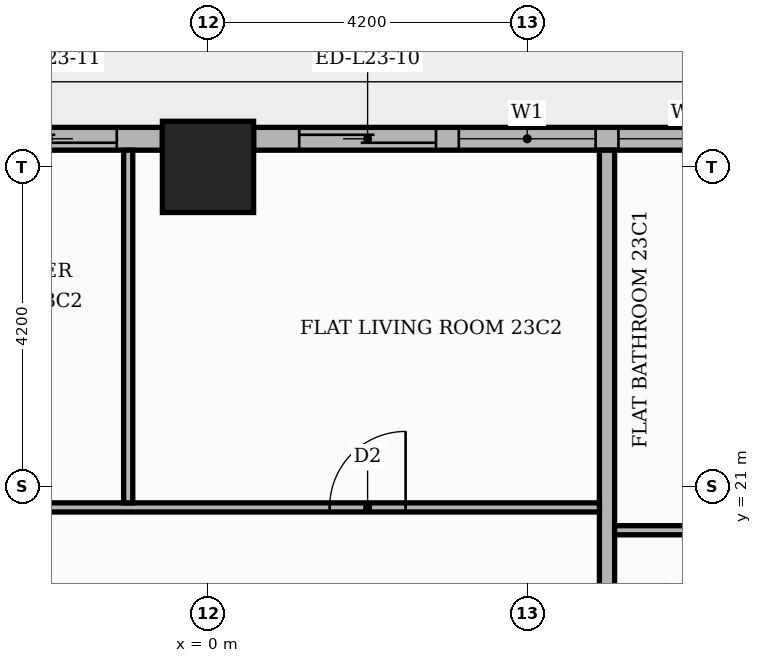
"""IFC4 building model, lengths in metres.
Left out: names, types, materials, properties, quantities, classifications, styles, units other than length and angle.
Written with IfcOpenShell. Run it as: python <this file> out.ifc"""

import sys

from ifc_helpers import new_model, si_unit, direction, frame, frame_2d, origin, origin_2d, place, context, subcontext, project, spatial, rectangle, extrude, element, fill, save


model = new_model("IFC4")
c1 = context("Model", 3, precision=1e-05, world=origin(), true_north=direction((0.0, 1.0)))
c2 = subcontext(c1, "Body", "Model", "MODEL_VIEW")
j1 = project(units=[si_unit("LENGTHUNIT", "METRE"), si_unit("PLANEANGLEUNIT", "RADIAN")], contexts=[c1])
p1 = place(None, origin())
s1 = spatial("IfcSite", under=j1, at=p1, CompositionType="ELEMENT")
p2 = place(p1, origin())
s2 = spatial("IfcBuilding", under=s1, at=p2, CompositionType="ELEMENT")
p3 = place(p2, frame((0.0, 0.0, 98.7)))
s3 = spatial("IfcBuildingStorey", under=s2, at=p3, CompositionType="ELEMENT", Elevation=98.7)
p4 = place(p3, frame((0.0, 25.2, 0.0), z_axis=(0.0, 0.0, 1.0), x_axis=(1.0, 0.0, 0.0)))
e1 = element("IfcColumn", 1, at=p4, inside=s3, PredefinedType="COLUMN", context=c2, shape_type="SweptSolid", body=[
    extrude(rectangle(XDim=1.2, YDim=1.2, at=origin_2d()), origin(), (0.0, 0.0, 1.0), 3.9),
])
p5 = place(p3, frame((7.8, 25.57, 0.0), z_axis=(0.0, 0.0, 1.0), x_axis=(-1.0, 0.0, 0.0)))
e2 = element("IfcWall", 2, at=p5, inside=s3, PredefinedType="STANDARD", context=c2, shape_type="SweptSolid", body=[
    extrude(rectangle(XDim=7.2, YDim=0.3, at=frame_2d((3.6, 0.0))), origin(), (0.0, 0.0, 1.0), 3.48),
])
p6 = place(p5, frame((0.6, 0.0, 0.9)))
e3 = element("IfcOpeningElement", 3, at=p6, cuts=e2, PredefinedType="OPENING", context=c2, shape_type="SweptSolid", body=[
    extrude(rectangle(XDim=1.8, YDim=2.1, at=frame_2d((0.9, 1.05))), frame((0.0, 0.16, 0.0), z_axis=(0.0, -1.0, 0.0), x_axis=(1.0, 0.0, 0.0)), (0.0, 0.0, 1.0), 0.32),
])
p7 = place(p5, frame((2.7, 0.0, 0.9)))
e4 = element("IfcOpeningElement", 4, at=p7, cuts=e2, PredefinedType="OPENING", context=c2, shape_type="SweptSolid", body=[
    extrude(rectangle(XDim=1.8, YDim=2.1, at=frame_2d((0.9, 1.05))), frame((0.0, 0.16, 0.0), z_axis=(0.0, -1.0, 0.0), x_axis=(1.0, 0.0, 0.0)), (0.0, 0.0, 1.0), 0.32),
])
p8 = place(p5, frame((4.8, 0.0, 0.0)))
e5 = element("IfcOpeningElement", 5, at=p8, cuts=e2, PredefinedType="OPENING", context=c2, shape_type="SweptSolid", body=[
    extrude(rectangle(XDim=1.8, YDim=2.4, at=frame_2d((0.9, 1.2))), frame((0.0, 0.16, 0.0), z_axis=(0.0, -1.0, 0.0), x_axis=(1.0, 0.0, 0.0)), (0.0, 0.0, 1.0), 0.32),
])
p9 = place(p3, frame((-0.6, 25.57, 0.0), z_axis=(0.0, 0.0, 1.0), x_axis=(-1.0, 0.0, 0.0)))
e6 = element("IfcWall", 6, at=p9, inside=s3, PredefinedType="STANDARD", context=c2, shape_type="SweptSolid", body=[
    extrude(rectangle(XDim=7.2, YDim=0.3, at=frame_2d((3.6, 0.0))), origin(), (0.0, 0.0, 1.0), 3.48),
])
p10 = place(p9, frame((0.6, 0.0, 0.0)))
e7 = element("IfcOpeningElement", 7, at=p10, cuts=e6, PredefinedType="OPENING", context=c2, shape_type="SweptSolid", body=[
    extrude(rectangle(XDim=1.8, YDim=2.4, at=frame_2d((0.9, 1.2))), frame((0.0, 0.16, 0.0), z_axis=(0.0, -1.0, 0.0), x_axis=(1.0, 0.0, 0.0)), (0.0, 0.0, 1.0), 0.32),
])
p11 = place(p9, frame((2.7, 0.0, 0.9)))
e8 = element("IfcOpeningElement", 8, at=p11, cuts=e6, PredefinedType="OPENING", context=c2, shape_type="SweptSolid", body=[
    extrude(rectangle(XDim=1.8, YDim=2.1, at=frame_2d((0.9, 1.05))), frame((0.0, 0.16, 0.0), z_axis=(0.0, -1.0, 0.0), x_axis=(1.0, 0.0, 0.0)), (0.0, 0.0, 1.0), 0.32),
])
p12 = place(p9, frame((4.8, 0.0, 0.9)))
e9 = element("IfcOpeningElement", 9, at=p12, cuts=e6, PredefinedType="OPENING", context=c2, shape_type="SweptSolid", body=[
    extrude(rectangle(XDim=1.8, YDim=2.1, at=frame_2d((0.9, 1.05))), frame((0.0, 0.16, 0.0), z_axis=(0.0, -1.0, 0.0), x_axis=(1.0, 0.0, 0.0)), (0.0, 0.0, 1.0), 0.32),
])
p13 = place(p3, frame((5.25, 13.75, 0.0), z_axis=(0.0, 0.0, 1.0), x_axis=(0.0, 1.0, 0.0)))
e10 = element("IfcWall", 10, at=p13, inside=s3, PredefinedType="PARTITIONING", context=c2, shape_type="SweptSolid", body=[
    extrude(rectangle(XDim=11.67, YDim=0.2, at=frame_2d((5.835, 0.0))), origin(), (0.0, 0.0, 1.0), 3.48),
])
p14 = place(p3, frame((5.35, 20.42, 0.0), z_axis=(0.0, 0.0, 1.0), x_axis=(1.0, 0.0, 0.0)))
e11 = element("IfcWall", 11, at=p14, inside=s3, PredefinedType="PARTITIONING", context=c2, shape_type="SweptSolid", body=[
    extrude(rectangle(XDim=20.07, YDim=0.12, at=frame_2d((10.035, 0.0))), origin(), (0.0, 0.0, 1.0), 3.48),
])
p15 = place(p14, frame((8.85, 0.0, 0.0)))
e12 = element("IfcOpeningElement", 12, at=p15, cuts=e11, PredefinedType="OPENING", context=c2, shape_type="SweptSolid", body=[
    extrude(rectangle(XDim=1.0, YDim=2.1, at=frame_2d((0.5, 1.05))), frame((0.0, 0.07, 0.0), z_axis=(0.0, -1.0, 0.0), x_axis=(1.0, 0.0, 0.0)), (0.0, 0.0, 1.0), 0.14),
])
p16 = place(p14, frame((5.75, 0.0, 0.0)))
e13 = element("IfcOpeningElement", 13, at=p16, cuts=e11, PredefinedType="OPENING", context=c2, shape_type="SweptSolid", body=[
    extrude(rectangle(XDim=0.9, YDim=2.1, at=frame_2d((0.45, 1.05))), frame((0.0, 0.07, 0.0), z_axis=(0.0, -1.0, 0.0), x_axis=(1.0, 0.0, 0.0)), (0.0, 0.0, 1.0), 0.14),
])
p17 = place(p3, frame((-13.55, 20.72, 0.0), z_axis=(0.0, 0.0, 1.0), x_axis=(1.0, 0.0, 0.0)))
e14 = element("IfcWall", 14, at=p17, inside=s3, PredefinedType="PARTITIONING", context=c2, shape_type="SweptSolid", body=[
    extrude(rectangle(XDim=18.7, YDim=0.12, at=frame_2d((9.35, 0.0))), origin(), (0.0, 0.0, 1.0), 3.48),
])
p18 = place(p17, frame((15.15, 0.0, 0.0)))
e15 = element("IfcOpeningElement", 15, at=p18, cuts=e14, PredefinedType="OPENING", context=c2, shape_type="SweptSolid", body=[
    extrude(rectangle(XDim=1.0, YDim=2.1, at=frame_2d((0.5, 1.05))), frame((0.0, 0.07, 0.0), z_axis=(0.0, -1.0, 0.0), x_axis=(1.0, 0.0, 0.0)), (0.0, 0.0, 1.0), 0.14),
])
p19 = place(p17, frame((9.95, 0.0, 0.0)))
e16 = element("IfcOpeningElement", 16, at=p19, cuts=e14, PredefinedType="OPENING", context=c2, shape_type="SweptSolid", body=[
    extrude(rectangle(XDim=0.9, YDim=2.1, at=frame_2d((0.45, 1.05))), frame((0.0, 0.07, 0.0), z_axis=(0.0, -1.0, 0.0), x_axis=(1.0, 0.0, 0.0)), (0.0, 0.0, 1.0), 0.14),
])
p20 = place(p17, frame((1.55, 0.0, 0.0)))
e17 = element("IfcOpeningElement", 17, at=p20, cuts=e14, PredefinedType="OPENING", context=c2, shape_type="SweptSolid", body=[
    extrude(rectangle(XDim=0.9, YDim=2.1, at=frame_2d((0.45, 1.05))), frame((0.0, 0.07, 0.0), z_axis=(0.0, -1.0, 0.0), x_axis=(1.0, 0.0, 0.0)), (0.0, 0.0, 1.0), 0.14),
])
p21 = place(p3, frame((-1.05, 20.78, 0.0), z_axis=(0.0, 0.0, 1.0), x_axis=(0.0, 1.0, 0.0)))
e18 = element("IfcWall", 18, at=p21, inside=s3, PredefinedType="PARTITIONING", context=c2, shape_type="SweptSolid", body=[
    extrude(rectangle(XDim=4.64, YDim=0.12, at=frame_2d((2.32, 0.0))), origin(), (0.0, 0.0, 1.0), 3.48),
])
p22 = place(p6, origin())
e19 = element("IfcWindow", 19, at=p22, inside=s3, PartitioningType="SINGLE_PANEL", PredefinedType="WINDOW", context=c2, shape_type="SweptSolid", body=[
    extrude(rectangle(XDim=1.8, YDim=2.1, at=frame_2d((0.9, 1.05))), frame((0.0, 0.03, 0.0), z_axis=(0.0, -1.0, 0.0), x_axis=(1.0, 0.0, 0.0)), (0.0, 0.0, 1.0), 0.06),
])
fill(e3, e19)
p23 = place(p7, origin())
e20 = element("IfcWindow", 20, at=p23, inside=s3, PartitioningType="SINGLE_PANEL", PredefinedType="WINDOW", context=c2, shape_type="SweptSolid", body=[
    extrude(rectangle(XDim=1.8, YDim=2.1, at=frame_2d((0.9, 1.05))), frame((0.0, 0.03, 0.0), z_axis=(0.0, -1.0, 0.0), x_axis=(1.0, 0.0, 0.0)), (0.0, 0.0, 1.0), 0.06),
])
fill(e4, e20)
p24 = place(p8, origin())
e21 = element("IfcDoor", 21, at=p24, inside=s3, OperationType="SLIDING_TO_RIGHT", PredefinedType="DOOR", context=c2, shape_type="SweptSolid", body=[
    extrude(rectangle(XDim=1.8, YDim=2.4, at=frame_2d((0.9, 1.2))), frame((0.0, 0.025, 0.0), z_axis=(0.0, -1.0, 0.0), x_axis=(1.0, 0.0, 0.0)), (0.0, 0.0, 1.0), 0.05),
])
fill(e5, e21)
p25 = place(p10, origin())
e22 = element("IfcDoor", 22, at=p25, inside=s3, OperationType="SLIDING_TO_LEFT", PredefinedType="DOOR", context=c2, shape_type="SweptSolid", body=[
    extrude(rectangle(XDim=1.8, YDim=2.4, at=frame_2d((0.9, 1.2))), frame((0.0, 0.025, 0.0), z_axis=(0.0, -1.0, 0.0), x_axis=(1.0, 0.0, 0.0)), (0.0, 0.0, 1.0), 0.05),
])
fill(e7, e22)
p26 = place(p18, origin())
e23 = element("IfcDoor", 23, at=p26, inside=s3, OperationType="SINGLE_SWING_RIGHT", PredefinedType="DOOR", context=c2, shape_type="SweptSolid", body=[
    extrude(rectangle(XDim=1.0, YDim=2.1, at=frame_2d((0.5, 1.05))), frame((0.0, 0.025, 0.0), z_axis=(0.0, -1.0, 0.0), x_axis=(1.0, 0.0, 0.0)), (0.0, 0.0, 1.0), 0.05),
])
fill(e15, e23)
save(model, sys.argv[1])
